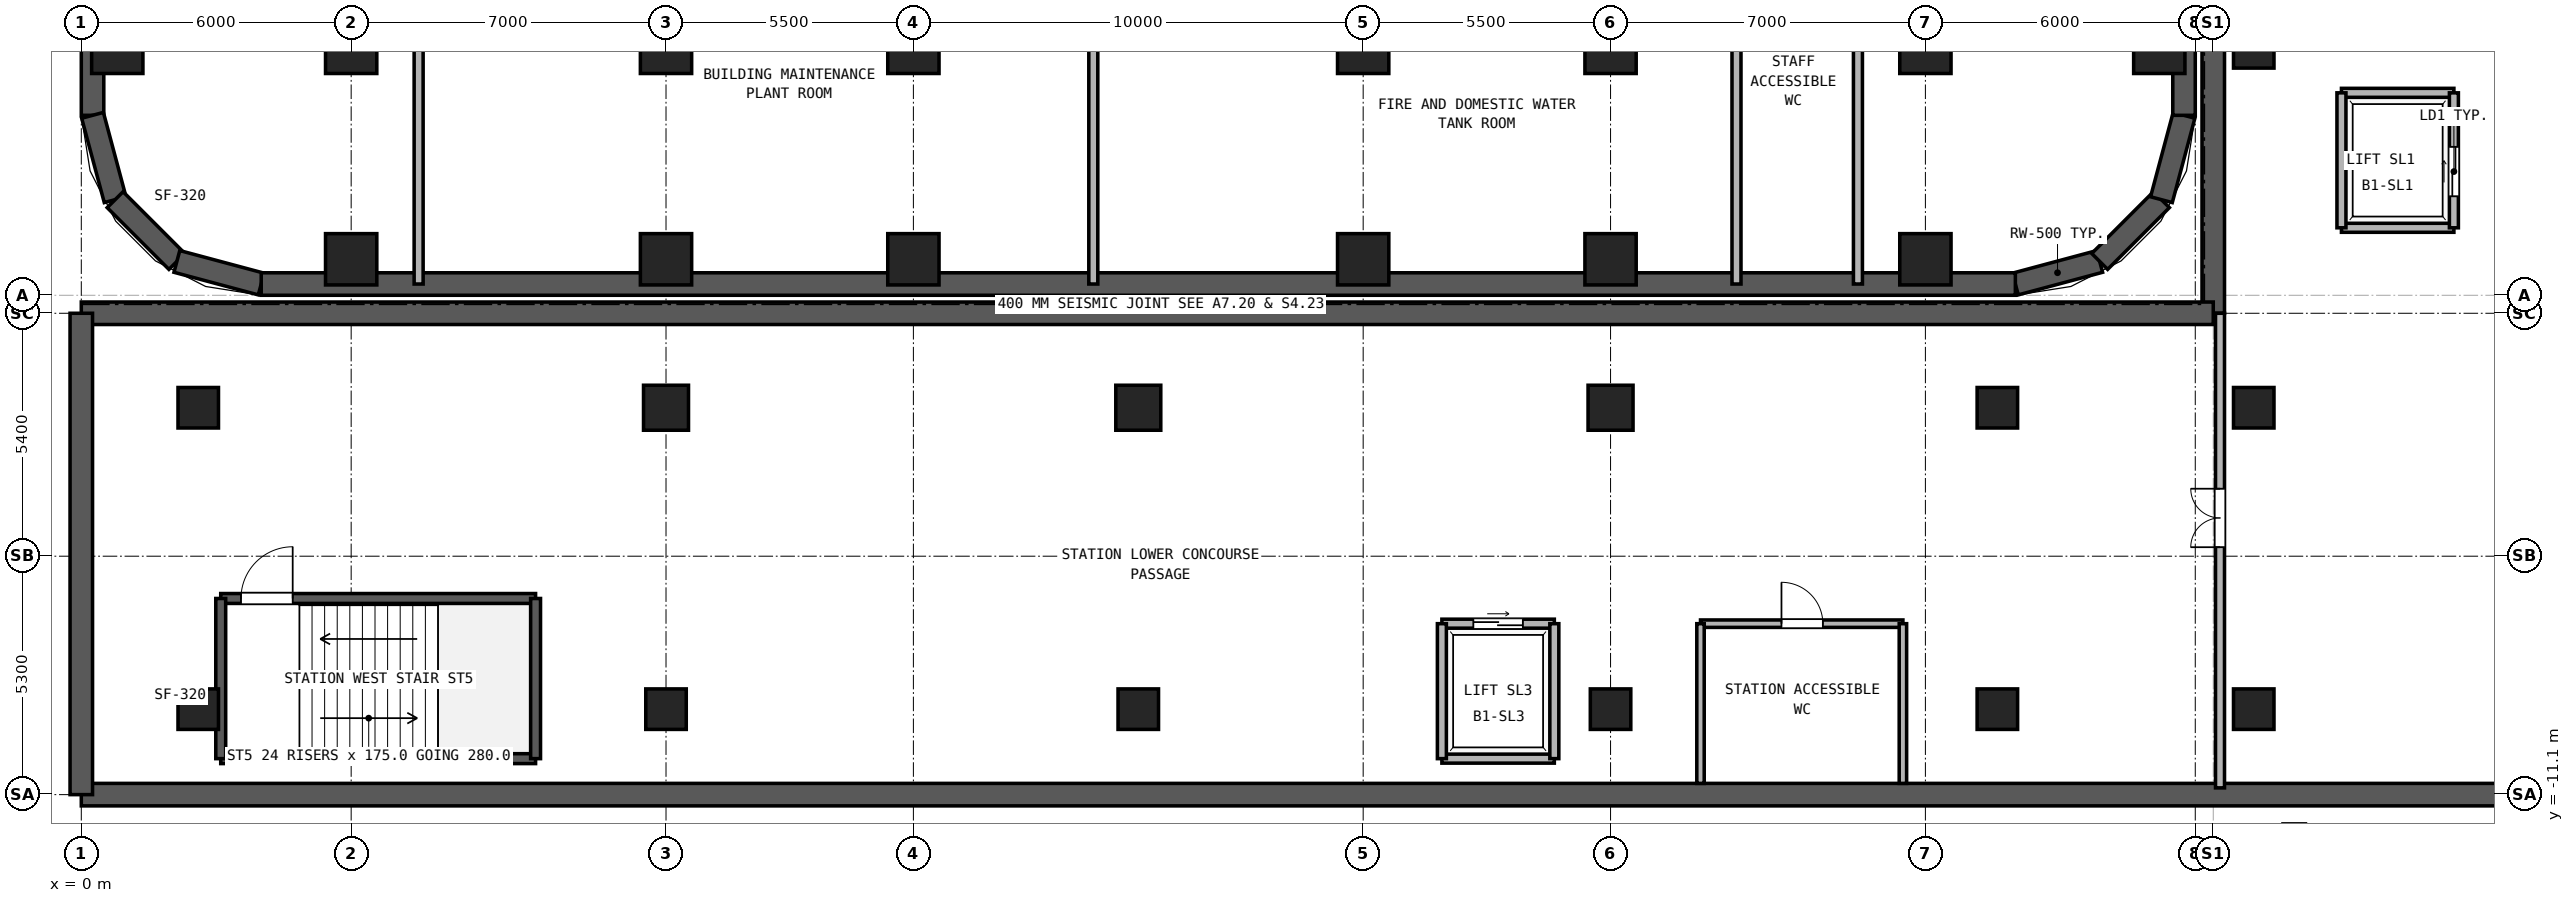
"""IFC4 building model, lengths in metres.
Left out: names, types, materials, properties, quantities, classifications, styles, units other than length and angle.
Written with IfcOpenShell. Run it as: python <this file> out.ifc"""

import sys

from ifc_helpers import new_model, si_unit, direction, frame, frame_2d, origin, origin_2d, place, context, subcontext, project, spatial, rectangle, hollow_rectangle, circle, extrude, source, transform, mapped, element, fill, save


model = new_model("IFC4")
c1 = context("Model", 3, precision=1e-05, world=origin(), true_north=direction((0.0, 1.0)))
c2 = subcontext(c1, "Body", "Model", "MODEL_VIEW")
j1 = project(units=[si_unit("LENGTHUNIT", "METRE"), si_unit("PLANEANGLEUNIT", "RADIAN")], contexts=[c1])
p1 = place(None, origin())
s1 = spatial("IfcSite", under=j1, at=p1, CompositionType="ELEMENT")
p2 = place(p1, origin())
s2 = spatial("IfcBuilding", under=s1, at=p2, CompositionType="ELEMENT")
p3 = place(p2, frame((0.0, 0.0, -4.2)))
s3 = spatial("IfcBuildingStorey", under=s2, at=p3, CompositionType="ELEMENT", Elevation=-4.2)
m1 = source(origin(), c2, "Body", "SweptSolid", [
    extrude(hollow_rectangle(XDim=1.14, YDim=1.14, WallThickness=0.07, at=origin_2d()), origin(), (0.0, 0.0, 1.0), 3.88),
])
for number, where, z_axis, x_axis in (
    (1, (6.0, 0.8, 0.0), (0.0, 0.0, 1.0), (1.0, 0.0, 0.0)),
    (2, (13.0, 0.8, 0.0), (0.0, 0.0, 1.0), (1.0, 0.0, 0.0)),
    (3, (18.5, 0.8, 0.0), (0.0, 0.0, 1.0), (1.0, 0.0, 0.0)),
    (4, (28.5, 0.8, 0.0), (0.0, 0.0, 1.0), (1.0, 0.0, 0.0)),
    (5, (34.0, 0.8, 0.0), (0.0, 0.0, 1.0), (1.0, 0.0, 0.0)),
    (6, (41.0, 0.8, 0.0), (0.0, 0.0, 1.0), (1.0, 0.0, 0.0)),
    (7, (0.8, 5.5, 0.0), (0.0, 0.0, 1.0), (1.0, 0.0, 0.0)),
    (8, (46.2, 5.5, 0.0), (0.0, 0.0, 1.0), (1.0, 0.0, 0.0)),
    (9, (6.0, 5.5, 0.0), (0.0, 0.0, 1.0), (1.0, 0.0, 0.0)),
    (10, (13.0, 5.5, 0.0), (0.0, 0.0, 1.0), (1.0, 0.0, 0.0)),
    (11, (18.5, 5.5, 0.0), (0.0, 0.0, 1.0), (1.0, 0.0, 0.0)),
    (12, (28.5, 5.5, 0.0), (0.0, 0.0, 1.0), (1.0, 0.0, 0.0)),
    (13, (34.0, 5.5, 0.0), (0.0, 0.0, 1.0), (1.0, 0.0, 0.0)),
    (14, (41.0, 5.5, 0.0), (0.0, 0.0, 1.0), (1.0, 0.0, 0.0)),
):
    element("IfcColumn", number, at=place(p3, frame(where, z_axis=z_axis, x_axis=x_axis)), inside=s3, PredefinedType="COLUMN", context=c2, shape_type="MappedRepresentation", body=[
        mapped(m1, transform((0.0, 0.0, 0.0), x_axis=(1.0, 0.0, 0.0), y_axis=(0.0, 1.0, 0.0), z_axis=(0.0, 0.0, 1.0), scale=1.0)),
    ])
m2 = source(origin(), c2, "Body", "SweptSolid", [
    extrude(hollow_rectangle(XDim=0.7, YDim=0.9, WallThickness=0.04, at=origin_2d()), origin(), (0.0, 0.0, 1.0), 3.88),
])
for number, where, z_axis, x_axis in (
    (15, (2.6, -9.2, 0.0), (0.0, 0.0, 1.0), (1.0, 0.0, 0.0)),
    (16, (2.6, -2.5, 0.0), (0.0, 0.0, 1.0), (1.0, 0.0, 0.0)),
    (17, (13.0, -9.2, 0.0), (0.0, 0.0, 1.0), (1.0, 0.0, 0.0)),
):
    element("IfcColumn", number, at=place(p3, frame(where, z_axis=z_axis, x_axis=x_axis)), inside=s3, PredefinedType="COLUMN", context=c2, shape_type="MappedRepresentation", body=[
        mapped(m2, transform((0.0, 0.0, 0.0), x_axis=(1.0, 0.0, 0.0), y_axis=(0.0, 1.0, 0.0), z_axis=(0.0, 0.0, 1.0), scale=1.0)),
    ])
m3 = source(origin(), c2, "Body", "SweptSolid", [
    extrude(circle(Radius=0.5, at=origin_2d()), origin(), (0.0, 0.0, 1.0), 3.88),
])
p4 = place(p3, frame((13.0, -2.5, 0.0), z_axis=(0.0, 0.0, 1.0), x_axis=(1.0, 0.0, 0.0)))
e18 = element("IfcColumn", 18, at=p4, inside=s3, PredefinedType="COLUMN", context=c2, shape_type="MappedRepresentation", body=[
    mapped(m3, transform((0.0, 0.0, 0.0), x_axis=(1.0, 0.0, 0.0), y_axis=(0.0, 1.0, 0.0), z_axis=(0.0, 0.0, 1.0), scale=1.0)),
])
p5 = place(p3, frame((23.5, -9.2, 0.0), z_axis=(0.0, 0.0, 1.0), x_axis=(1.0, 0.0, 0.0)))
e19 = element("IfcColumn", 19, at=p5, inside=s3, PredefinedType="COLUMN", context=c2, shape_type="MappedRepresentation", body=[
    mapped(m2, transform((0.0, 0.0, 0.0), x_axis=(1.0, 0.0, 0.0), y_axis=(0.0, 1.0, 0.0), z_axis=(0.0, 0.0, 1.0), scale=1.0)),
])
p6 = place(p3, frame((23.5, -2.5, 0.0), z_axis=(0.0, 0.0, 1.0), x_axis=(1.0, 0.0, 0.0)))
e20 = element("IfcColumn", 20, at=p6, inside=s3, PredefinedType="COLUMN", context=c2, shape_type="MappedRepresentation", body=[
    mapped(m3, transform((0.0, 0.0, 0.0), x_axis=(1.0, 0.0, 0.0), y_axis=(0.0, 1.0, 0.0), z_axis=(0.0, 0.0, 1.0), scale=1.0)),
])
p7 = place(p3, frame((34.0, -9.2, 0.0), z_axis=(0.0, 0.0, 1.0), x_axis=(1.0, 0.0, 0.0)))
e21 = element("IfcColumn", 21, at=p7, inside=s3, PredefinedType="COLUMN", context=c2, shape_type="MappedRepresentation", body=[
    mapped(m2, transform((0.0, 0.0, 0.0), x_axis=(1.0, 0.0, 0.0), y_axis=(0.0, 1.0, 0.0), z_axis=(0.0, 0.0, 1.0), scale=1.0)),
])
p8 = place(p3, frame((34.0, -2.5, 0.0), z_axis=(0.0, 0.0, 1.0), x_axis=(1.0, 0.0, 0.0)))
e22 = element("IfcColumn", 22, at=p8, inside=s3, PredefinedType="COLUMN", context=c2, shape_type="MappedRepresentation", body=[
    mapped(m3, transform((0.0, 0.0, 0.0), x_axis=(1.0, 0.0, 0.0), y_axis=(0.0, 1.0, 0.0), z_axis=(0.0, 0.0, 1.0), scale=1.0)),
])
for number, where, z_axis, x_axis in (
    (23, (42.6, -9.2, 0.0), (0.0, 0.0, 1.0), (1.0, 0.0, 0.0)),
    (24, (42.6, -2.5, 0.0), (0.0, 0.0, 1.0), (1.0, 0.0, 0.0)),
    (25, (48.3, -9.2, 0.0), (0.0, 0.0, 1.0), (1.0, 0.0, 0.0)),
    (26, (48.3, -2.5, 0.0), (0.0, 0.0, 1.0), (1.0, 0.0, 0.0)),
    (27, (48.3, 5.5, 0.0), (0.0, 0.0, 1.0), (1.0, 0.0, 0.0)),
):
    element("IfcColumn", number, at=place(p3, frame(where, z_axis=z_axis, x_axis=x_axis)), inside=s3, PredefinedType="COLUMN", context=c2, shape_type="MappedRepresentation", body=[
        mapped(m2, transform((0.0, 0.0, 0.0), x_axis=(1.0, 0.0, 0.0), y_axis=(0.0, 1.0, 0.0), z_axis=(0.0, 0.0, 1.0), scale=1.0)),
    ])
for number, where, z_axis, x_axis in (
    (28, (43.0, 0.25, 0.0), (0.0, 0.0, 1.0), (0.966, 0.259, 0.0)),
    (29, (44.875, 0.752, 0.0), (0.0, 0.0, 1.0), (0.707, 0.707, 0.0)),
    (30, (46.248, 2.125, 0.0), (0.0, 0.0, 1.0), (0.259, 0.966, 0.0)),
):
    element("IfcWall", number, at=place(p3, frame(where, z_axis=z_axis, x_axis=x_axis)), inside=s3, PredefinedType="USERDEFINED", context=c2, shape_type="SweptSolid", body=[
        extrude(rectangle(XDim=1.941, YDim=0.5, at=frame_2d((0.971, 0.0))), origin(), (0.0, 0.0, 1.0), 3.88),
    ])
for number, where, z_axis, x_axis in (
    (31, (46.75, 4.0, 0.0), (0.0, 0.0, 1.0), (0.0, 1.0, 0.0)),
    (32, (0.25, 36.5, 0.0), (0.0, 0.0, 1.0), (0.0, -1.0, 0.0)),
):
    element("IfcWall", number, at=place(p3, frame(where, z_axis=z_axis, x_axis=x_axis)), inside=s3, PredefinedType="USERDEFINED", context=c2, shape_type="SweptSolid", body=[
        extrude(rectangle(XDim=32.5, YDim=0.5, at=frame_2d((16.25, 0.0))), origin(), (0.0, 0.0, 1.0), 3.88),
    ])
for number, where, z_axis, x_axis in (
    (33, (0.25, 4.0, 0.0), (0.0, 0.0, 1.0), (0.259, -0.966, 0.0)),
    (34, (0.752, 2.125, 0.0), (0.0, 0.0, 1.0), (0.707, -0.707, 0.0)),
    (35, (2.125, 0.752, 0.0), (0.0, 0.0, 1.0), (0.966, -0.259, 0.0)),
):
    element("IfcWall", number, at=place(p3, frame(where, z_axis=z_axis, x_axis=x_axis)), inside=s3, PredefinedType="USERDEFINED", context=c2, shape_type="SweptSolid", body=[
        extrude(rectangle(XDim=1.941, YDim=0.5, at=frame_2d((0.971, 0.0))), origin(), (0.0, 0.0, 1.0), 3.88),
    ])
p9 = place(p3, frame((4.0, 0.25, 0.0), z_axis=(0.0, 0.0, 1.0), x_axis=(1.0, 0.0, 0.0)))
e36 = element("IfcWall", 36, at=p9, inside=s3, PredefinedType="USERDEFINED", context=c2, shape_type="SweptSolid", body=[
    extrude(rectangle(XDim=39.0, YDim=0.5, at=frame_2d((19.5, 0.0))), origin(), (0.0, 0.0, 1.0), 3.88),
])
p10 = place(p3, frame((0.0, -11.1, 0.0), z_axis=(0.0, 0.0, 1.0), x_axis=(1.0, 0.0, 0.0)))
e37 = element("IfcWall", 37, at=p10, inside=s3, PredefinedType="USERDEFINED", context=c2, shape_type="SweptSolid", body=[
    extrude(rectangle(XDim=71.6, YDim=0.5, at=frame_2d((35.8, 0.0))), origin(), (0.0, 0.0, 1.0), 3.88),
])
p11 = place(p3, frame((47.4, 40.5, 0.0), z_axis=(0.0, 0.0, 1.0), x_axis=(0.0, -1.0, 0.0)))
e38 = element("IfcWall", 38, at=p11, inside=s3, PredefinedType="USERDEFINED", context=c2, shape_type="SweptSolid", body=[
    extrude(rectangle(XDim=40.9, YDim=0.5, at=frame_2d((20.45, 0.0))), origin(), (0.0, 0.0, 1.0), 3.88),
])
p12 = place(p3, frame((47.4, -0.4, 0.0), z_axis=(0.0, 0.0, 1.0), x_axis=(-1.0, 0.0, 0.0)))
e39 = element("IfcWall", 39, at=p12, inside=s3, PredefinedType="USERDEFINED", context=c2, shape_type="SweptSolid", body=[
    extrude(rectangle(XDim=47.4, YDim=0.5, at=frame_2d((23.7, 0.0))), origin(), (0.0, 0.0, 1.0), 3.88),
])
p13 = place(p3, frame((0.0, -0.4, 0.0), z_axis=(0.0, 0.0, 1.0), x_axis=(0.0, -1.0, 0.0)))
e40 = element("IfcWall", 40, at=p13, inside=s3, PredefinedType="USERDEFINED", context=c2, shape_type="SweptSolid", body=[
    extrude(rectangle(XDim=10.7, YDim=0.5, at=frame_2d((5.35, 0.0))), origin(), (0.0, 0.0, 1.0), 3.88),
])
p14 = place(p3, frame((7.5, 0.25, 0.0), z_axis=(0.0, 0.0, 1.0), x_axis=(0.0, 1.0, 0.0)))
e41 = element("IfcWall", 41, at=p14, inside=s3, PredefinedType="PARTITIONING", context=c2, shape_type="SweptSolid", body=[
    extrude(rectangle(XDim=10.75, YDim=0.2, at=frame_2d((5.375, 0.0))), origin(), (0.0, 0.0, 1.0), 3.88),
])
p15 = place(p14, frame((9.2, 0.0, 0.0)))
e42 = element("IfcOpeningElement", 42, at=p15, cuts=e41, PredefinedType="OPENING", context=c2, shape_type="SweptSolid", body=[
    extrude(rectangle(XDim=1.05, YDim=2.15, at=frame_2d((0.525, 1.075))), frame((0.0, 0.11, 0.0), z_axis=(0.0, -1.0, 0.0), x_axis=(1.0, 0.0, 0.0)), (0.0, 0.0, 1.0), 0.22),
])
p16 = place(p3, frame((39.5, 0.25, 0.0), z_axis=(0.0, 0.0, 1.0), x_axis=(0.0, 1.0, 0.0)))
e43 = element("IfcWall", 43, at=p16, inside=s3, PredefinedType="PARTITIONING", context=c2, shape_type="SweptSolid", body=[
    extrude(rectangle(XDim=10.75, YDim=0.2, at=frame_2d((5.375, 0.0))), origin(), (0.0, 0.0, 1.0), 3.88),
])
p17 = place(p16, frame((9.2, 0.0, 0.0)))
e44 = element("IfcOpeningElement", 44, at=p17, cuts=e43, PredefinedType="OPENING", context=c2, shape_type="SweptSolid", body=[
    extrude(rectangle(XDim=1.05, YDim=2.15, at=frame_2d((0.525, 1.075))), frame((0.0, 0.11, 0.0), z_axis=(0.0, -1.0, 0.0), x_axis=(1.0, 0.0, 0.0)), (0.0, 0.0, 1.0), 0.22),
])
for number, where, z_axis, x_axis in (
    (45, (22.5, 0.25, 0.0), (0.0, 0.0, 1.0), (0.0, 1.0, 0.0)),
    (46, (36.8, 0.25, 0.0), (0.0, 0.0, 1.0), (0.0, 1.0, 0.0)),
):
    element("IfcWall", number, at=place(p3, frame(where, z_axis=z_axis, x_axis=x_axis)), inside=s3, PredefinedType="PARTITIONING", context=c2, shape_type="SweptSolid", body=[
        extrude(rectangle(XDim=8.65, YDim=0.2, at=frame_2d((4.325, 0.0))), origin(), (0.0, 0.0, 1.0), 3.88),
    ])
p18 = place(p3, frame((3.1, -10.3, 0.0), z_axis=(0.0, 0.0, 1.0), x_axis=(1.0, 0.0, 0.0)))
e47 = element("IfcWall", 47, at=p18, inside=s3, PredefinedType="SOLIDWALL", context=c2, shape_type="SweptSolid", body=[
    extrude(rectangle(XDim=7.0, YDim=0.22, at=frame_2d((3.5, 0.0))), origin(), (0.0, 0.0, 1.0), 3.88),
])
p19 = place(p3, frame((3.1, -6.74, 0.0), z_axis=(0.0, 0.0, 1.0), x_axis=(1.0, 0.0, 0.0)))
e48 = element("IfcWall", 48, at=p19, inside=s3, PredefinedType="SOLIDWALL", context=c2, shape_type="SweptSolid", body=[
    extrude(rectangle(XDim=7.0, YDim=0.22, at=frame_2d((3.5, 0.0))), origin(), (0.0, 0.0, 1.0), 3.88),
])
p20 = place(p19, frame((0.45, 0.0, 0.0)))
e49 = element("IfcOpeningElement", 49, at=p20, cuts=e48, PredefinedType="OPENING", context=c2, shape_type="SweptSolid", body=[
    extrude(rectangle(XDim=1.15, YDim=2.2, at=frame_2d((0.575, 1.1))), frame((0.0, 0.12, 0.0), z_axis=(0.0, -1.0, 0.0), x_axis=(1.0, 0.0, 0.0)), (0.0, 0.0, 1.0), 0.24),
])
for number, where, z_axis, x_axis in (
    (50, (3.1, -10.3, 0.0), (0.0, 0.0, 1.0), (0.0, 1.0, 0.0)),
    (51, (10.1, -10.3, 0.0), (0.0, 0.0, 1.0), (0.0, 1.0, 0.0)),
):
    element("IfcWall", number, at=place(p3, frame(where, z_axis=z_axis, x_axis=x_axis)), inside=s3, PredefinedType="SOLIDWALL", context=c2, shape_type="SweptSolid", body=[
        extrude(rectangle(XDim=3.56, YDim=0.22, at=frame_2d((1.78, 0.0))), origin(), (0.0, 0.0, 1.0), 3.88),
    ])
for number, where, z_axis, x_axis in (
    (52, (50.25, 1.5, 0.0), (0.0, 0.0, 1.0), (1.0, 0.0, 0.0)),
    (53, (50.25, 4.5, 0.0), (0.0, 0.0, 1.0), (1.0, 0.0, 0.0)),
):
    element("IfcWall", number, at=place(p3, frame(where, z_axis=z_axis, x_axis=x_axis)), inside=s3, PredefinedType="PARTITIONING", context=c2, shape_type="SweptSolid", body=[
        extrude(rectangle(XDim=2.5, YDim=0.2, at=frame_2d((1.25, 0.0))), origin(), (0.0, 0.0, 1.0), 3.88),
    ])
p21 = place(p3, frame((50.25, 1.5, 0.0), z_axis=(0.0, 0.0, 1.0), x_axis=(0.0, 1.0, 0.0)))
e54 = element("IfcWall", 54, at=p21, inside=s3, PredefinedType="PARTITIONING", context=c2, shape_type="SweptSolid", body=[
    extrude(rectangle(XDim=3.0, YDim=0.2, at=frame_2d((1.5, 0.0))), origin(), (0.0, 0.0, 1.0), 3.88),
])
p22 = place(p3, frame((52.75, 1.5, 0.0), z_axis=(0.0, 0.0, 1.0), x_axis=(0.0, 1.0, 0.0)))
e55 = element("IfcWall", 55, at=p22, inside=s3, PredefinedType="PARTITIONING", context=c2, shape_type="SweptSolid", body=[
    extrude(rectangle(XDim=3.0, YDim=0.2, at=frame_2d((1.5, 0.0))), origin(), (0.0, 0.0, 1.0), 3.88),
])
p23 = place(p22, frame((0.7, 0.0, 0.0)))
e56 = element("IfcOpeningElement", 56, at=p23, cuts=e55, PredefinedType="OPENING", context=c2, shape_type="SweptSolid", body=[
    extrude(rectangle(XDim=1.1, YDim=2.25, at=frame_2d((0.55, 1.125))), frame((0.0, 0.11, 0.0), z_axis=(0.0, -1.0, 0.0), x_axis=(1.0, 0.0, 0.0)), (0.0, 0.0, 1.0), 0.22),
])
p24 = place(p3, frame((30.25, -10.3, 0.0), z_axis=(0.0, 0.0, 1.0), x_axis=(1.0, 0.0, 0.0)))
e57 = element("IfcWall", 57, at=p24, inside=s3, PredefinedType="PARTITIONING", context=c2, shape_type="SweptSolid", body=[
    extrude(rectangle(XDim=2.5, YDim=0.2, at=frame_2d((1.25, 0.0))), origin(), (0.0, 0.0, 1.0), 3.88),
])
p25 = place(p3, frame((30.25, -7.3, 0.0), z_axis=(0.0, 0.0, 1.0), x_axis=(1.0, 0.0, 0.0)))
e58 = element("IfcWall", 58, at=p25, inside=s3, PredefinedType="PARTITIONING", context=c2, shape_type="SweptSolid", body=[
    extrude(rectangle(XDim=2.5, YDim=0.2, at=frame_2d((1.25, 0.0))), origin(), (0.0, 0.0, 1.0), 3.88),
])
p26 = place(p25, frame((0.7, 0.0, 0.0)))
e59 = element("IfcOpeningElement", 59, at=p26, cuts=e58, PredefinedType="OPENING", context=c2, shape_type="SweptSolid", body=[
    extrude(rectangle(XDim=1.1, YDim=2.25, at=frame_2d((0.55, 1.125))), frame((0.0, 0.11, 0.0), z_axis=(0.0, -1.0, 0.0), x_axis=(1.0, 0.0, 0.0)), (0.0, 0.0, 1.0), 0.22),
])
for number, where, z_axis, x_axis in (
    (60, (30.25, -10.3, 0.0), (0.0, 0.0, 1.0), (0.0, 1.0, 0.0)),
    (61, (32.75, -10.3, 0.0), (0.0, 0.0, 1.0), (0.0, 1.0, 0.0)),
):
    element("IfcWall", number, at=place(p3, frame(where, z_axis=z_axis, x_axis=x_axis)), inside=s3, PredefinedType="PARTITIONING", context=c2, shape_type="SweptSolid", body=[
        extrude(rectangle(XDim=3.0, YDim=0.2, at=frame_2d((1.5, 0.0))), origin(), (0.0, 0.0, 1.0), 3.88),
    ])
p27 = place(p3, frame((47.55, -10.95, 0.0), z_axis=(0.0, 0.0, 1.0), x_axis=(0.0, 1.0, 0.0)))
e62 = element("IfcWall", 62, at=p27, inside=s3, PredefinedType="PARTITIONING", context=c2, shape_type="SweptSolid", body=[
    extrude(rectangle(XDim=10.55, YDim=0.2, at=frame_2d((5.275, 0.0))), origin(), (0.0, 0.0, 1.0), 3.88),
])
p28 = place(p27, frame((5.35, 0.0, 0.0)))
e63 = element("IfcOpeningElement", 63, at=p28, cuts=e62, PredefinedType="OPENING", context=c2, shape_type="SweptSolid", body=[
    extrude(rectangle(XDim=1.3, YDim=2.2, at=frame_2d((0.65, 1.1))), frame((0.0, 0.11, 0.0), z_axis=(0.0, -1.0, 0.0), x_axis=(1.0, 0.0, 0.0)), (0.0, 0.0, 1.0), 0.22),
])
p29 = place(p3, frame((36.0, -7.3, 0.0), z_axis=(0.0, 0.0, 1.0), x_axis=(1.0, 0.0, 0.0)))
e64 = element("IfcWall", 64, at=p29, inside=s3, PredefinedType="PARTITIONING", context=c2, shape_type="SweptSolid", body=[
    extrude(rectangle(XDim=4.5, YDim=0.165, at=frame_2d((2.25, 0.0))), origin(), (0.0, 0.0, 1.0), 3.88),
])
p30 = place(p29, frame((1.8, 0.0, 0.0)))
e65 = element("IfcOpeningElement", 65, at=p30, cuts=e64, PredefinedType="OPENING", context=c2, shape_type="SweptSolid", body=[
    extrude(rectangle(XDim=0.92, YDim=2.1, at=frame_2d((0.46, 1.05))), frame((0.0, 0.093, 0.0), z_axis=(0.0, -1.0, 0.0), x_axis=(1.0, 0.0, 0.0)), (0.0, 0.0, 1.0), 0.185),
])
for number, where, z_axis, x_axis in (
    (66, (36.0, -10.85, 0.0), (0.0, 0.0, 1.0), (0.0, 1.0, 0.0)),
    (67, (40.5, -10.85, 0.0), (0.0, 0.0, 1.0), (0.0, 1.0, 0.0)),
):
    element("IfcWall", number, at=place(p3, frame(where, z_axis=z_axis, x_axis=x_axis)), inside=s3, PredefinedType="PARTITIONING", context=c2, shape_type="SweptSolid", body=[
        extrude(rectangle(XDim=3.55, YDim=0.165, at=frame_2d((1.775, 0.0))), origin(), (0.0, 0.0, 1.0), 3.88),
    ])
p31 = place(p20, origin())
e68 = element("IfcDoor", 68, at=p31, inside=s3, OperationType="SINGLE_SWING_RIGHT", PredefinedType="DOOR", context=c2, shape_type="SweptSolid", body=[
    extrude(rectangle(XDim=1.15, YDim=2.2, at=frame_2d((0.575, 1.1))), frame((0.0, 0.025, 0.0), z_axis=(0.0, -1.0, 0.0), x_axis=(1.0, 0.0, 0.0)), (0.0, 0.0, 1.0), 0.05),
])
fill(e49, e68)
p32 = place(p23, origin())
e69 = element("IfcDoor", 69, at=p32, inside=s3, OperationType="DOUBLE_DOOR_SLIDING", PredefinedType="DOOR", context=c2, shape_type="SweptSolid", body=[
    extrude(rectangle(XDim=1.1, YDim=2.25, at=frame_2d((0.55, 1.125))), frame((0.0, 0.025, 0.0), z_axis=(0.0, -1.0, 0.0), x_axis=(1.0, 0.0, 0.0)), (0.0, 0.0, 1.0), 0.05),
])
fill(e56, e69)
p33 = place(p26, origin())
e70 = element("IfcDoor", 70, at=p33, inside=s3, OperationType="DOUBLE_DOOR_SLIDING", PredefinedType="DOOR", context=c2, shape_type="SweptSolid", body=[
    extrude(rectangle(XDim=1.1, YDim=2.25, at=frame_2d((0.55, 1.125))), frame((0.0, 0.025, 0.0), z_axis=(0.0, -1.0, 0.0), x_axis=(1.0, 0.0, 0.0)), (0.0, 0.0, 1.0), 0.05),
])
fill(e59, e70)
p34 = place(p28, origin())
e71 = element("IfcDoor", 71, at=p34, inside=s3, OperationType="DOUBLE_DOOR_SINGLE_SWING", PredefinedType="DOOR", context=c2, shape_type="SweptSolid", body=[
    extrude(rectangle(XDim=1.3, YDim=2.2, at=frame_2d((0.65, 1.1))), frame((0.0, 0.025, 0.0), z_axis=(0.0, -1.0, 0.0), x_axis=(1.0, 0.0, 0.0)), (0.0, 0.0, 1.0), 0.05),
])
fill(e63, e71)
p35 = place(p30, origin())
e72 = element("IfcDoor", 72, at=p35, inside=s3, OperationType="SINGLE_SWING_LEFT", PredefinedType="DOOR", context=c2, shape_type="SweptSolid", body=[
    extrude(rectangle(XDim=0.92, YDim=2.1, at=frame_2d((0.46, 1.05))), frame((0.0, 0.025, 0.0), z_axis=(0.0, -1.0, 0.0), x_axis=(1.0, 0.0, 0.0)), (0.0, 0.0, 1.0), 0.05),
])
fill(e65, e72)
save(model, sys.argv[1])
